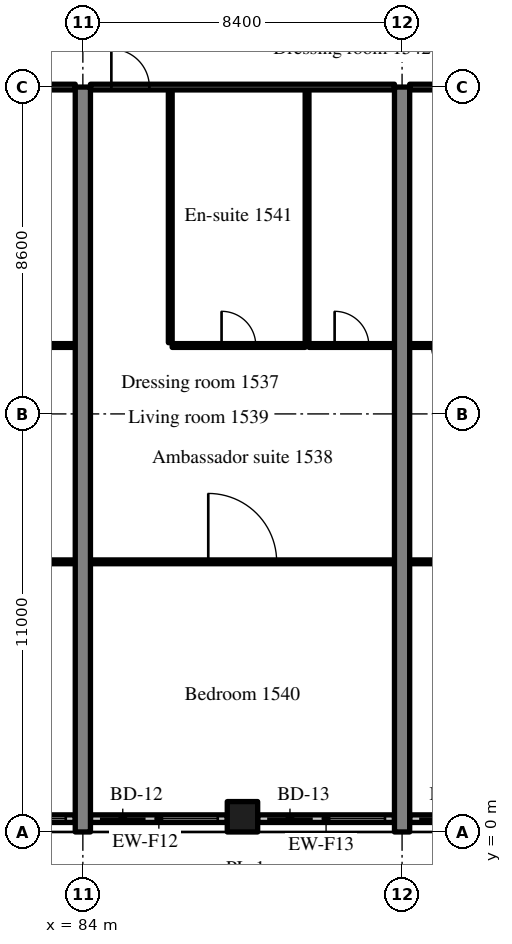
"""IFC4 building model, lengths in metres.
Left out: names, types, materials, properties, quantities, classifications, styles, units other than length and angle.
Written with IfcOpenShell. Run it as: python <this file> out.ifc"""

import sys

from ifc_helpers import new_model, si_unit, direction, frame, frame_2d, origin, origin_2d, place, context, subcontext, project, spatial, rectangle, extrude, source, transform, mapped, element, fill, save


model = new_model("IFC4")
c1 = context("Model", 3, precision=1e-05, world=origin(), true_north=direction((0.0, 1.0)))
c2 = subcontext(c1, "Body", "Model", "MODEL_VIEW")
j1 = project(units=[si_unit("LENGTHUNIT", "METRE"), si_unit("PLANEANGLEUNIT", "RADIAN")], contexts=[c1])
p1 = place(None, origin())
s1 = spatial("IfcSite", under=j1, at=p1, CompositionType="ELEMENT")
p2 = place(p1, origin())
s2 = spatial("IfcBuilding", under=s1, at=p2, CompositionType="ELEMENT")
p3 = place(p2, frame((0.0, 0.0, 65.8)))
s3 = spatial("IfcBuildingStorey", under=s2, at=p3, CompositionType="ELEMENT", Elevation=65.8)
m1 = source(origin(), c2, "Body", "SweptSolid", [
    extrude(rectangle(XDim=19.6, YDim=0.4, at=frame_2d((9.8, 0.0))), origin(), (0.0, 0.0, 1.0), 3.52),
])
for number, where, z_axis, x_axis in (
    (1, (84.0, 0.0, 0.0), (0.0, 0.0, 1.0), (0.0, 1.0, 0.0)),
    (2, (92.4, 0.0, 0.0), (0.0, 0.0, 1.0), (0.0, 1.0, 0.0)),
):
    element("IfcWall", number, at=place(p3, frame(where, z_axis=z_axis, x_axis=x_axis)), inside=s3, PredefinedType="SHEAR", context=c2, shape_type="MappedRepresentation", body=[
        mapped(m1, transform((0.0, 0.0, 0.0), scale=1.0)),
    ])
m2 = source(origin(), c2, "Body", "SweptSolid", [
    extrude(rectangle(XDim=0.8, YDim=0.8, at=origin_2d()), origin(), (0.0, 0.0, 1.0), 3.52),
])
p4 = place(p3, frame((88.2, 0.4, 0.0), z_axis=(0.0, 0.0, 1.0), x_axis=(1.0, 0.0, 0.0)))
e3 = element("IfcColumn", 3, at=p4, inside=s3, PredefinedType="COLUMN", context=c2, shape_type="MappedRepresentation", body=[
    mapped(m2, transform((0.0, 0.0, 0.0), scale=1.0)),
])
m3 = source(origin(), c2, "Body", "SweptSolid", [
    extrude(rectangle(XDim=3.6, YDim=0.2, at=frame_2d((1.8, 0.0))), origin(), (0.0, 0.0, 1.0), 2.82),
])
p5 = place(p3, frame((80.2, 0.35, 0.0), z_axis=(0.0, 0.0, 1.0), x_axis=(1.0, 0.0, 0.0)))
e4 = element("IfcWall", 4, at=p5, inside=s3, PredefinedType="SOLIDWALL", context=c2, shape_type="MappedRepresentation", body=[
    mapped(m3, transform((0.0, 0.0, 0.0), scale=1.0)),
])
m4 = source(origin(), c2, "Body", "SweptSolid", [
    extrude(rectangle(XDim=1.2, YDim=2.4, at=frame_2d((0.6, 1.2))), frame((0.0, 0.11, 0.0), z_axis=(0.0, -1.0, 0.0), x_axis=(1.0, 0.0, 0.0)), (0.0, 0.0, 1.0), 0.22),
])
p6 = place(p5, frame((0.25, 0.0, 0.0)))
e5 = element("IfcOpeningElement", 5, at=p6, cuts=e4, PredefinedType="OPENING", context=c2, shape_type="MappedRepresentation", body=[
    mapped(m4, transform((0.0, 0.0, 0.0), scale=1.0)),
])
m5 = source(origin(), c2, "Body", "SweptSolid", [
    extrude(rectangle(XDim=1.5, YDim=1.5, at=frame_2d((0.75, 0.75))), frame((0.0, 0.11, 0.0), z_axis=(0.0, -1.0, 0.0), x_axis=(1.0, 0.0, 0.0)), (0.0, 0.0, 1.0), 0.22),
])
p7 = place(p5, frame((1.85, 0.0, 0.9)))
e6 = element("IfcOpeningElement", 6, at=p7, cuts=e4, PredefinedType="OPENING", context=c2, shape_type="MappedRepresentation", body=[
    mapped(m5, transform((0.0, 0.0, 0.0), scale=1.0)),
])
p8 = place(p3, frame((84.2, 0.35, 0.0), z_axis=(0.0, 0.0, 1.0), x_axis=(1.0, 0.0, 0.0)))
e7 = element("IfcWall", 7, at=p8, inside=s3, PredefinedType="SOLIDWALL", context=c2, shape_type="MappedRepresentation", body=[
    mapped(m3, transform((0.0, 0.0, 0.0), scale=1.0)),
])
p9 = place(p8, frame((0.25, 0.0, 0.0)))
e8 = element("IfcOpeningElement", 8, at=p9, cuts=e7, PredefinedType="OPENING", context=c2, shape_type="MappedRepresentation", body=[
    mapped(m4, transform((0.0, 0.0, 0.0), scale=1.0)),
])
p10 = place(p8, frame((1.85, 0.0, 0.9)))
e9 = element("IfcOpeningElement", 9, at=p10, cuts=e7, PredefinedType="OPENING", context=c2, shape_type="MappedRepresentation", body=[
    mapped(m5, transform((0.0, 0.0, 0.0), scale=1.0)),
])
m6 = source(origin(), c2, "Body", "SweptSolid", [
    extrude(rectangle(XDim=3.6, YDim=0.2, at=frame_2d((1.8, 0.0))), origin(), (0.0, 0.0, 1.0), 2.82),
])
p11 = place(p3, frame((88.6, 0.35, 0.0), z_axis=(0.0, 0.0, 1.0), x_axis=(1.0, 0.0, 0.0)))
e10 = element("IfcWall", 10, at=p11, inside=s3, PredefinedType="SOLIDWALL", context=c2, shape_type="MappedRepresentation", body=[
    mapped(m6, transform((0.0, 0.0, 0.0), scale=1.0)),
])
p12 = place(p11, frame((0.25, 0.0, 0.0)))
e11 = element("IfcOpeningElement", 11, at=p12, cuts=e10, PredefinedType="OPENING", context=c2, shape_type="MappedRepresentation", body=[
    mapped(m4, transform((0.0, 0.0, 0.0), scale=1.0)),
])
p13 = place(p11, frame((1.85, 0.0, 0.9)))
e12 = element("IfcOpeningElement", 12, at=p13, cuts=e10, PredefinedType="OPENING", context=c2, shape_type="MappedRepresentation", body=[
    mapped(m5, transform((0.0, 0.0, 0.0), scale=1.0)),
])
m7 = source(origin(), c2, "Body", "SweptSolid", [
    extrude(rectangle(XDim=4.055, YDim=0.2, at=frame_2d((2.027, 0.0))), origin(), (0.0, 0.0, 1.0), 2.82),
])
p14 = place(p3, frame((92.6, 0.35, 0.0), z_axis=(0.0, 0.0, 1.0), x_axis=(1.0, 0.0, 0.0)))
e13 = element("IfcWall", 13, at=p14, inside=s3, PredefinedType="SOLIDWALL", context=c2, shape_type="MappedRepresentation", body=[
    mapped(m7, transform((0.0, 0.0, 0.0), scale=1.0)),
])
p15 = place(p14, frame((0.25, 0.0, 0.0)))
e14 = element("IfcOpeningElement", 14, at=p15, cuts=e13, PredefinedType="OPENING", context=c2, shape_type="MappedRepresentation", body=[
    mapped(m4, transform((0.0, 0.0, 0.0), scale=1.0)),
])
p16 = place(p14, frame((2.305, 0.0, 0.9)))
e15 = element("IfcOpeningElement", 15, at=p16, cuts=e13, PredefinedType="OPENING", context=c2, shape_type="MappedRepresentation", body=[
    mapped(m5, transform((0.0, 0.0, 0.0), scale=1.0)),
])
m8 = source(origin(), c2, "Body", "SweptSolid", [
    extrude(rectangle(XDim=2.25, YDim=0.1, at=frame_2d((1.125, 0.0))), origin(), (0.0, 0.0, 1.0), 3.52),
])
p17 = place(p3, frame((81.55, 12.8, 0.0), z_axis=(0.0, 0.0, 1.0), x_axis=(1.0, 0.0, 0.0)))
e16 = element("IfcWall", 16, at=p17, inside=s3, PredefinedType="PARTITIONING", context=c2, shape_type="MappedRepresentation", body=[
    mapped(m8, transform((0.0, 0.0, 0.0), scale=1.0)),
])
m9 = source(origin(), c2, "Body", "SweptSolid", [
    extrude(rectangle(XDim=0.9, YDim=2.1, at=frame_2d((0.45, 1.05))), frame((0.0, 0.06, 0.0), z_axis=(0.0, -1.0, 0.0), x_axis=(1.0, 0.0, 0.0)), (0.0, 0.0, 1.0), 0.12),
])
p18 = place(p17, frame((0.675, 0.0, 0.0)))
e17 = element("IfcOpeningElement", 17, at=p18, cuts=e16, PredefinedType="OPENING", context=c2, shape_type="MappedRepresentation", body=[
    mapped(m9, transform((0.0, 0.0, 0.0), scale=1.0)),
])
m10 = source(origin(), c2, "Body", "SweptSolid", [
    extrude(rectangle(XDim=8.0, YDim=0.1, at=frame_2d((4.0, 0.0))), origin(), (0.0, 0.0, 1.0), 3.52),
])
p19 = place(p3, frame((75.8, 7.108, 0.0), z_axis=(0.0, 0.0, 1.0), x_axis=(1.0, 0.0, 0.0)))
e18 = element("IfcWall", 18, at=p19, inside=s3, PredefinedType="PARTITIONING", context=c2, shape_type="MappedRepresentation", body=[
    mapped(m10, transform((0.0, 0.0, 0.0), scale=1.0)),
])
m11 = source(origin(), c2, "Body", "SweptSolid", [
    extrude(rectangle(XDim=1.8, YDim=2.1, at=frame_2d((0.9, 1.05))), frame((0.0, 0.06, 0.0), z_axis=(0.0, -1.0, 0.0), x_axis=(1.0, 0.0, 0.0)), (0.0, 0.0, 1.0), 0.12),
])
p20 = place(p19, frame((3.1, 0.0, 0.0)))
e19 = element("IfcOpeningElement", 19, at=p20, cuts=e18, PredefinedType="OPENING", context=c2, shape_type="MappedRepresentation", body=[
    mapped(m11, transform((0.0, 0.0, 0.0), scale=1.0)),
])
m12 = source(origin(), c2, "Body", "SweptSolid", [
    extrude(rectangle(XDim=8.0, YDim=0.15, at=frame_2d((4.0, 0.0))), origin(), (0.0, 0.0, 1.0), 2.82),
])
p21 = place(p3, frame((75.8, 19.6, 0.0), z_axis=(0.0, 0.0, 1.0), x_axis=(1.0, 0.0, 0.0)))
e20 = element("IfcWall", 20, at=p21, inside=s3, PredefinedType="PARTITIONING", context=c2, shape_type="MappedRepresentation", body=[
    mapped(m12, transform((0.0, 0.0, 0.0), scale=1.0)),
])
m13 = source(origin(), c2, "Body", "SweptSolid", [
    extrude(rectangle(XDim=1.0, YDim=2.1, at=frame_2d((0.5, 1.05))), frame((0.0, 0.085, 0.0), z_axis=(0.0, -1.0, 0.0), x_axis=(1.0, 0.0, 0.0)), (0.0, 0.0, 1.0), 0.17),
])
p22 = place(p21, frame((0.55, 0.0, 0.0)))
e21 = element("IfcOpeningElement", 21, at=p22, cuts=e20, PredefinedType="OPENING", context=c2, shape_type="MappedRepresentation", body=[
    mapped(m13, transform((0.0, 0.0, 0.0), scale=1.0)),
])
m14 = source(origin(), c2, "Body", "SweptSolid", [
    extrude(rectangle(XDim=6.65, YDim=0.1, at=frame_2d((3.325, 0.0))), origin(), (0.0, 0.0, 1.0), 3.52),
])
for number, where, z_axis, x_axis in (
    (22, (86.3, 12.875, 0.0), (0.0, 0.0, 1.0), (0.0, 1.0, 0.0)),
    (23, (89.9, 12.875, 0.0), (0.0, 0.0, 1.0), (0.0, 1.0, 0.0)),
):
    element("IfcWall", number, at=place(p3, frame(where, z_axis=z_axis, x_axis=x_axis)), inside=s3, PredefinedType="PARTITIONING", context=c2, shape_type="MappedRepresentation", body=[
        mapped(m14, transform((0.0, 0.0, 0.0), scale=1.0)),
    ])
m15 = source(origin(), c2, "Body", "SweptSolid", [
    extrude(rectangle(XDim=3.5, YDim=0.1, at=frame_2d((1.75, 0.0))), origin(), (0.0, 0.0, 1.0), 3.52),
])
p23 = place(p3, frame((86.35, 12.8, 0.0), z_axis=(0.0, 0.0, 1.0), x_axis=(1.0, 0.0, 0.0)))
e24 = element("IfcWall", 24, at=p23, inside=s3, PredefinedType="PARTITIONING", context=c2, shape_type="MappedRepresentation", body=[
    mapped(m15, transform((0.0, 0.0, 0.0), scale=1.0)),
])
p24 = place(p23, frame((1.3, 0.0, 0.0)))
e25 = element("IfcOpeningElement", 25, at=p24, cuts=e24, PredefinedType="OPENING", context=c2, shape_type="MappedRepresentation", body=[
    mapped(m9, transform((0.0, 0.0, 0.0), scale=1.0)),
])
p25 = place(p3, frame((89.95, 12.8, 0.0), z_axis=(0.0, 0.0, 1.0), x_axis=(1.0, 0.0, 0.0)))
e26 = element("IfcWall", 26, at=p25, inside=s3, PredefinedType="PARTITIONING", context=c2, shape_type="MappedRepresentation", body=[
    mapped(m8, transform((0.0, 0.0, 0.0), scale=1.0)),
])
p26 = place(p25, frame((0.675, 0.0, 0.0)))
e27 = element("IfcOpeningElement", 27, at=p26, cuts=e26, PredefinedType="OPENING", context=c2, shape_type="MappedRepresentation", body=[
    mapped(m9, transform((0.0, 0.0, 0.0), scale=1.0)),
])
p27 = place(p3, frame((84.2, 7.108, 0.0), z_axis=(0.0, 0.0, 1.0), x_axis=(1.0, 0.0, 0.0)))
e28 = element("IfcWall", 28, at=p27, inside=s3, PredefinedType="PARTITIONING", context=c2, shape_type="MappedRepresentation", body=[
    mapped(m10, transform((0.0, 0.0, 0.0), scale=1.0)),
])
p28 = place(p27, frame((3.1, 0.0, 0.0)))
e29 = element("IfcOpeningElement", 29, at=p28, cuts=e28, PredefinedType="OPENING", context=c2, shape_type="MappedRepresentation", body=[
    mapped(m11, transform((0.0, 0.0, 0.0), scale=1.0)),
])
p29 = place(p3, frame((84.2, 19.6, 0.0), z_axis=(0.0, 0.0, 1.0), x_axis=(1.0, 0.0, 0.0)))
e30 = element("IfcWall", 30, at=p29, inside=s3, PredefinedType="PARTITIONING", context=c2, shape_type="MappedRepresentation", body=[
    mapped(m12, transform((0.0, 0.0, 0.0), scale=1.0)),
])
p30 = place(p29, frame((0.55, 0.0, 0.0)))
e31 = element("IfcOpeningElement", 31, at=p30, cuts=e30, PredefinedType="OPENING", context=c2, shape_type="MappedRepresentation", body=[
    mapped(m13, transform((0.0, 0.0, 0.0), scale=1.0)),
])
m16 = source(origin(), c2, "Body", "SweptSolid", [
    extrude(rectangle(XDim=2.05, YDim=0.1, at=frame_2d((1.025, 0.0))), origin(), (0.0, 0.0, 1.0), 3.52),
])
p31 = place(p3, frame((92.6, 12.8, 0.0), z_axis=(0.0, 0.0, 1.0), x_axis=(1.0, 0.0, 0.0)))
e32 = element("IfcWall", 32, at=p31, inside=s3, PredefinedType="PARTITIONING", context=c2, shape_type="MappedRepresentation", body=[
    mapped(m16, transform((0.0, 0.0, 0.0), scale=1.0)),
])
p32 = place(p31, frame((0.575, 0.0, 0.0)))
e33 = element("IfcOpeningElement", 33, at=p32, cuts=e32, PredefinedType="OPENING", context=c2, shape_type="MappedRepresentation", body=[
    mapped(m9, transform((0.0, 0.0, 0.0), scale=1.0)),
])
m17 = source(origin(), c2, "Body", "SweptSolid", [
    extrude(rectangle(XDim=7.8, YDim=0.1, at=frame_2d((3.9, 0.0))), origin(), (0.0, 0.0, 1.0), 3.52),
])
p33 = place(p3, frame((92.6, 7.108, 0.0), z_axis=(0.0, 0.0, 1.0), x_axis=(1.0, 0.0, 0.0)))
e34 = element("IfcWall", 34, at=p33, inside=s3, PredefinedType="PARTITIONING", context=c2, shape_type="MappedRepresentation", body=[
    mapped(m17, transform((0.0, 0.0, 0.0), scale=1.0)),
])
p34 = place(p33, frame((3.0, 0.0, 0.0)))
e35 = element("IfcOpeningElement", 35, at=p34, cuts=e34, PredefinedType="OPENING", context=c2, shape_type="MappedRepresentation", body=[
    mapped(m11, transform((0.0, 0.0, 0.0), scale=1.0)),
])
m18 = source(origin(), c2, "Body", "SweptSolid", [
    extrude(rectangle(XDim=7.8, YDim=0.15, at=frame_2d((3.9, 0.0))), origin(), (0.0, 0.0, 1.0), 2.82),
])
p35 = place(p3, frame((92.6, 19.6, 0.0), z_axis=(0.0, 0.0, 1.0), x_axis=(1.0, 0.0, 0.0)))
e36 = element("IfcWall", 36, at=p35, inside=s3, PredefinedType="PARTITIONING", context=c2, shape_type="MappedRepresentation", body=[
    mapped(m18, transform((0.0, 0.0, 0.0), scale=1.0)),
])
p36 = place(p35, frame((6.25, 0.0, 0.0)))
e37 = element("IfcOpeningElement", 37, at=p36, cuts=e36, PredefinedType="OPENING", context=c2, shape_type="MappedRepresentation", body=[
    mapped(m13, transform((0.0, 0.0, 0.0), scale=1.0)),
])
m19 = source(origin(), c2, "Body", "SweptSolid", [
    extrude(rectangle(XDim=1.5, YDim=1.5, at=frame_2d((0.75, 0.75))), frame((0.0, 0.03, 0.0), z_axis=(0.0, -1.0, 0.0), x_axis=(1.0, 0.0, 0.0)), (0.0, 0.0, 1.0), 0.06),
])
p37 = place(p7, origin())
e38 = element("IfcWindow", 38, at=p37, inside=s3, PartitioningType="SINGLE_PANEL", PredefinedType="WINDOW", context=c2, shape_type="MappedRepresentation", body=[
    mapped(m19, transform((0.0, 0.0, 0.0), scale=1.0)),
])
fill(e6, e38)
m20 = source(origin(), c2, "Body", "SweptSolid", [
    extrude(rectangle(XDim=1.2, YDim=2.4, at=frame_2d((0.6, 1.2))), frame((0.0, 0.025, 0.0), z_axis=(0.0, -1.0, 0.0), x_axis=(1.0, 0.0, 0.0)), (0.0, 0.0, 1.0), 0.05),
])
p38 = place(p9, origin())
e39 = element("IfcDoor", 39, at=p38, inside=s3, OperationType="SLIDING_TO_RIGHT", PredefinedType="DOOR", context=c2, shape_type="MappedRepresentation", body=[
    mapped(m20, transform((0.0, 0.0, 0.0), scale=1.0)),
])
fill(e8, e39)
p39 = place(p10, origin())
e40 = element("IfcWindow", 40, at=p39, inside=s3, PartitioningType="SINGLE_PANEL", PredefinedType="WINDOW", context=c2, shape_type="MappedRepresentation", body=[
    mapped(m19, transform((0.0, 0.0, 0.0), scale=1.0)),
])
fill(e9, e40)
p40 = place(p12, origin())
e41 = element("IfcDoor", 41, at=p40, inside=s3, OperationType="SLIDING_TO_LEFT", PredefinedType="DOOR", context=c2, shape_type="MappedRepresentation", body=[
    mapped(m20, transform((0.0, 0.0, 0.0), scale=1.0)),
])
fill(e11, e41)
p41 = place(p13, origin())
e42 = element("IfcWindow", 42, at=p41, inside=s3, PartitioningType="SINGLE_PANEL", PredefinedType="WINDOW", context=c2, shape_type="MappedRepresentation", body=[
    mapped(m19, transform((0.0, 0.0, 0.0), scale=1.0)),
])
fill(e12, e42)
p42 = place(p15, origin())
e43 = element("IfcDoor", 43, at=p42, inside=s3, OperationType="SLIDING_TO_RIGHT", PredefinedType="DOOR", context=c2, shape_type="MappedRepresentation", body=[
    mapped(m20, transform((0.0, 0.0, 0.0), scale=1.0)),
])
fill(e14, e43)
m21 = source(origin(), c2, "Body", "SweptSolid", [
    extrude(rectangle(XDim=0.9, YDim=2.1, at=frame_2d((0.45, 1.05))), frame((0.0, 0.025, 0.0), z_axis=(0.0, -1.0, 0.0), x_axis=(1.0, 0.0, 0.0)), (0.0, 0.0, 1.0), 0.05),
])
p43 = place(p24, origin())
e44 = element("IfcDoor", 44, at=p43, inside=s3, OperationType="SINGLE_SWING_LEFT", PredefinedType="DOOR", context=c2, shape_type="MappedRepresentation", body=[
    mapped(m21, transform((0.0, 0.0, 0.0), scale=1.0)),
])
fill(e25, e44)
p44 = place(p26, origin())
e45 = element("IfcDoor", 45, at=p44, inside=s3, OperationType="SINGLE_SWING_LEFT", PredefinedType="DOOR", context=c2, shape_type="MappedRepresentation", body=[
    mapped(m21, transform((0.0, 0.0, 0.0), scale=1.0)),
])
fill(e27, e45)
m22 = source(origin(), c2, "Body", "SweptSolid", [
    extrude(rectangle(XDim=1.8, YDim=2.1, at=frame_2d((0.9, 1.05))), frame((0.0, 0.025, 0.0), z_axis=(0.0, -1.0, 0.0), x_axis=(1.0, 0.0, 0.0)), (0.0, 0.0, 1.0), 0.05),
])
p45 = place(p28, origin())
e46 = element("IfcDoor", 46, at=p45, inside=s3, OperationType="DOUBLE_DOOR_SINGLE_SWING", PredefinedType="DOOR", context=c2, shape_type="MappedRepresentation", body=[
    mapped(m22, transform((0.0, 0.0, 0.0), scale=1.0)),
])
fill(e29, e46)
m23 = source(origin(), c2, "Body", "SweptSolid", [
    extrude(rectangle(XDim=1.0, YDim=2.1, at=frame_2d((0.5, 1.05))), frame((0.0, 0.025, 0.0), z_axis=(0.0, -1.0, 0.0), x_axis=(1.0, 0.0, 0.0)), (0.0, 0.0, 1.0), 0.05),
])
p46 = place(p30, origin())
e47 = element("IfcDoor", 47, at=p46, inside=s3, OperationType="SINGLE_SWING_LEFT", PredefinedType="DOOR", context=c2, shape_type="MappedRepresentation", body=[
    mapped(m23, transform((0.0, 0.0, 0.0), scale=1.0)),
])
fill(e31, e47)
p47 = place(p32, origin())
e48 = element("IfcDoor", 48, at=p47, inside=s3, OperationType="SINGLE_SWING_RIGHT", PredefinedType="DOOR", context=c2, shape_type="MappedRepresentation", body=[
    mapped(m21, transform((0.0, 0.0, 0.0), scale=1.0)),
])
fill(e33, e48)
save(model, sys.argv[1])
